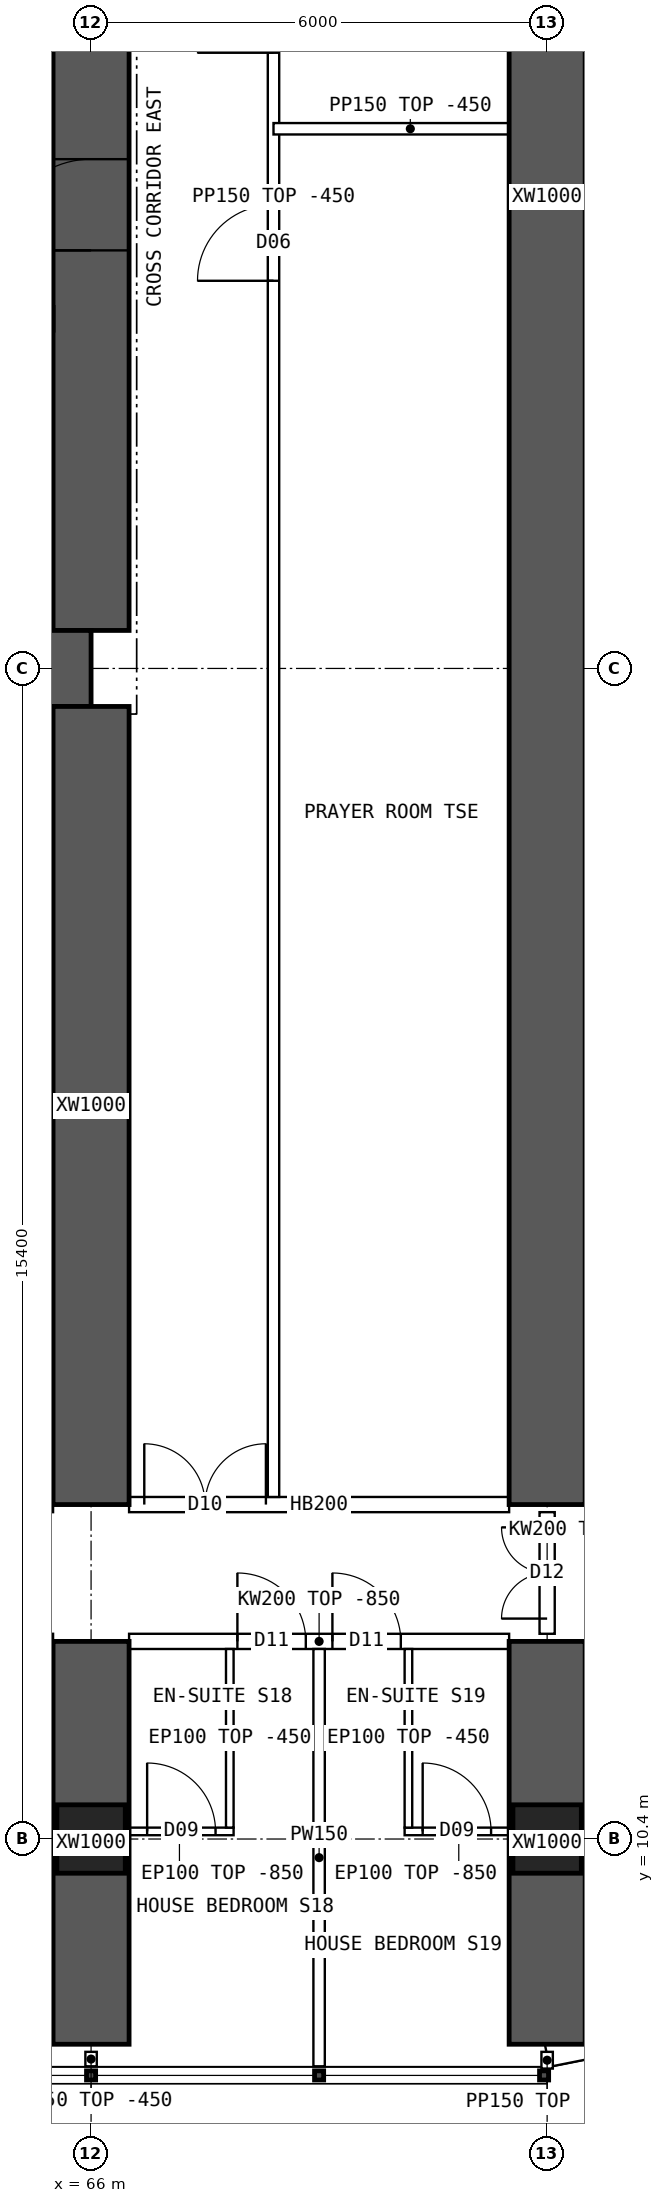
"""IFC4 building model, lengths in metres.
Left out: names, types, materials, properties, quantities, classifications, styles, units other than length and angle.
Written with IfcOpenShell. Run it as: python <this file> out.ifc"""

import sys

from ifc_helpers import new_model, si_unit, direction, frame, frame_2d, origin, origin_2d, place, context, subcontext, project, spatial, polyline, rectangle, hollow_rectangle, outline, extrude, element, fill, save


model = new_model("IFC4")
c1 = context("Model", 3, precision=1e-05, world=origin(), true_north=direction((0.0, 1.0)))
c2 = subcontext(c1, "Body", "Model", "MODEL_VIEW")
j1 = project(units=[si_unit("LENGTHUNIT", "METRE"), si_unit("PLANEANGLEUNIT", "RADIAN")], contexts=[c1])
p1 = place(None, origin())
s1 = spatial("IfcSite", under=j1, at=p1, CompositionType="ELEMENT")
p2 = place(p1, origin())
s2 = spatial("IfcBuilding", under=s1, at=p2, CompositionType="ELEMENT")
p3 = place(p2, frame((0.0, 0.0, 20.2)))
s3 = spatial("IfcBuildingStorey", under=s2, at=p3, CompositionType="ELEMENT", Elevation=20.2)
for number, where, z_axis, x_axis in (
    (1, (66.0, 10.4, 0.0), (0.0, 0.0, 1.0), (1.0, 0.0, 0.0)),
    (2, (72.0, 10.4, 0.0), (0.0, 0.0, 1.0), (1.0, 0.0, 0.0)),
):
    element("IfcColumn", number, at=place(p3, frame(where, z_axis=z_axis, x_axis=x_axis)), inside=s3, PredefinedType="COLUMN", context=c2, shape_type="SweptSolid", body=[
        extrude(hollow_rectangle(XDim=0.9, YDim=0.9, WallThickness=0.09, at=origin_2d()), origin(), (0.0, 0.0, 1.0), 3.75),
    ])
p4 = place(p3, frame((18.0, 25.8, 0.0), z_axis=(0.0, 0.0, 1.0), x_axis=(1.0, 0.0, 0.0)))
e3 = element("IfcWall", 3, at=p4, inside=s3, PredefinedType="SHEAR", context=c2, shape_type="SweptSolid", body=[
    extrude(rectangle(XDim=48.0, YDim=1.0, at=frame_2d((24.0, 0.0))), origin(), (0.0, 0.0, 1.0), 3.75),
])
p5 = place(p3, frame((66.0, 26.3, 0.0), z_axis=(0.0, 0.0, 1.0), x_axis=(0.0, 1.0, 0.0)))
e4 = element("IfcWall", 4, at=p5, inside=s3, PredefinedType="SHEAR", context=c2, shape_type="SweptSolid", body=[
    extrude(rectangle(XDim=11.4, YDim=1.0, at=frame_2d((5.7, 0.0))), origin(), (0.0, 0.0, 1.0), 3.75),
])
p6 = place(p5, frame((5.0, 0.0, 0.0)))
e5 = element("IfcOpeningElement", 5, at=p6, cuts=e4, PredefinedType="OPENING", context=c2, shape_type="SweptSolid", body=[
    extrude(rectangle(XDim=1.2, YDim=2.1, at=frame_2d((0.6, 1.05))), frame((0.0, 0.51, 0.0), z_axis=(0.0, -1.0, 0.0), x_axis=(1.0, 0.0, 0.0)), (0.0, 0.0, 1.0), 1.02),
])
p7 = place(p3, frame((66.0, 7.7, 0.0), z_axis=(0.0, 0.0, 1.0), x_axis=(0.0, 1.0, 0.0)))
e6 = element("IfcWall", 6, at=p7, inside=s3, PredefinedType="SHEAR", context=c2, shape_type="SweptSolid", body=[
    extrude(rectangle(XDim=5.3, YDim=1.0, at=frame_2d((2.65, 0.0))), origin(), (0.0, 0.0, 1.0), 3.75),
])
p8 = place(p3, frame((66.0, 14.8, 0.0), z_axis=(0.0, 0.0, 1.0), x_axis=(0.0, 1.0, 0.0)))
e7 = element("IfcWall", 7, at=p8, inside=s3, PredefinedType="SHEAR", context=c2, shape_type="SweptSolid", body=[
    extrude(rectangle(XDim=10.5, YDim=1.0, at=frame_2d((5.25, 0.0))), origin(), (0.0, 0.0, 1.0), 3.75),
])
p9 = place(p3, frame((72.0, 7.7, 0.0), z_axis=(0.0, 0.0, 1.0), x_axis=(0.0, 1.0, 0.0)))
e8 = element("IfcWall", 8, at=p9, inside=s3, PredefinedType="SHEAR", context=c2, shape_type="SweptSolid", body=[
    extrude(rectangle(XDim=5.3, YDim=1.0, at=frame_2d((2.65, 0.0))), origin(), (0.0, 0.0, 1.0), 3.75),
])
p10 = place(p3, frame((72.0, 14.8, 0.0), z_axis=(0.0, 0.0, 1.0), x_axis=(0.0, 1.0, 0.0)))
e9 = element("IfcWall", 9, at=p10, inside=s3, PredefinedType="SHEAR", context=c2, shape_type="SweptSolid", body=[
    extrude(rectangle(XDim=34.4, YDim=1.0, at=frame_2d((17.2, 0.0))), origin(), (0.0, 0.0, 1.0), 3.75),
])
p11 = place(p3, frame((72.0, 7.55, 0.0), z_axis=(0.0, 0.0, 1.0), x_axis=(0.980787251524, 0.195080412259, 0.0)))
e10 = element("IfcWall", 10, at=p11, inside=s3, PredefinedType="SOLIDWALL", context=c2, shape_type="SweptSolid", body=[
    extrude(outline(polyline([(-0.03, -0.15), (3.249, -0.15), (3.189, 0.15), (0.03, 0.15), (-0.03, -0.15)])), origin(), (0.0, 0.0, 1.0), 3.3),
])
p12 = place(p11, frame((0.909, 0.0, 0.9)))
e11 = element("IfcOpeningElement", 11, at=p12, cuts=e10, PredefinedType="OPENING", context=c2, shape_type="SweptSolid", body=[
    extrude(rectangle(XDim=1.4, YDim=1.8, at=frame_2d((0.7, 0.9))), frame((0.0, 0.16, 0.0), z_axis=(0.0, -1.0, 0.0), x_axis=(1.0, 0.0, 0.0)), (0.0, 0.0, 1.0), 0.32),
])
p13 = place(p3, frame((66.5, 13.0, 0.0), z_axis=(0.0, 0.0, 1.0), x_axis=(1.0, 0.0, 0.0)))
e12 = element("IfcWall", 12, at=p13, inside=s3, PredefinedType="SOLIDWALL", context=c2, shape_type="SweptSolid", body=[
    extrude(outline(polyline([(0.0, 0.0), (5.0, 0.0), (5.0, 2.9), (0.0, 2.9), (0.0, 0.0)])), frame((0.0, 0.1, 0.0), z_axis=(0.0, -1.0, 0.0), x_axis=(1.0, 0.0, 0.0)), (0.0, 0.0, 1.0), 0.2),
])
p14 = place(p13, frame((1.425, 0.0, 0.0)))
e13 = element("IfcOpeningElement", 13, at=p14, cuts=e12, PredefinedType="OPENING", context=c2, shape_type="SweptSolid", body=[
    extrude(rectangle(XDim=0.9, YDim=2.1, at=frame_2d((0.45, 1.05))), frame((0.0, 0.11, 0.0), z_axis=(0.0, -1.0, 0.0), x_axis=(1.0, 0.0, 0.0)), (0.0, 0.0, 1.0), 0.22),
])
p15 = place(p13, frame((2.675, 0.0, 0.0)))
e14 = element("IfcOpeningElement", 14, at=p15, cuts=e12, PredefinedType="OPENING", context=c2, shape_type="SweptSolid", body=[
    extrude(rectangle(XDim=0.9, YDim=2.1, at=frame_2d((0.45, 1.05))), frame((0.0, 0.11, 0.0), z_axis=(0.0, -1.0, 0.0), x_axis=(1.0, 0.0, 0.0)), (0.0, 0.0, 1.0), 0.22),
])
p16 = place(p3, frame((66.5, 14.8, 0.0), z_axis=(0.0, 0.0, 1.0), x_axis=(1.0, 0.0, 0.0)))
e15 = element("IfcWall", 15, at=p16, inside=s3, PredefinedType="SOLIDWALL", context=c2, shape_type="SweptSolid", body=[
    extrude(rectangle(XDim=5.0, YDim=0.2, at=frame_2d((2.5, 0.0))), origin(), (0.0, 0.0, 1.0), 3.3),
])
p17 = place(p16, frame((0.2, 0.0, 0.0)))
e16 = element("IfcOpeningElement", 16, at=p17, cuts=e15, PredefinedType="OPENING", context=c2, shape_type="SweptSolid", body=[
    extrude(rectangle(XDim=1.6, YDim=2.1, at=frame_2d((0.8, 1.05))), frame((0.0, 0.11, 0.0), z_axis=(0.0, -1.0, 0.0), x_axis=(1.0, 0.0, 0.0)), (0.0, 0.0, 1.0), 0.22),
])
p18 = place(p3, frame((65.55, 10.5, 0.0), z_axis=(0.0, 0.0, 1.0), x_axis=(-1.0, 0.0, 0.0)))
e17 = element("IfcWall", 17, at=p18, inside=s3, PredefinedType="PARTITIONING", context=c2, shape_type="SweptSolid", body=[
    extrude(outline(polyline([(0.0, 0.0), (1.425, 0.0), (1.425, 2.9), (0.0, 2.9), (0.0, 0.0)])), frame((0.0, 0.05, 0.0), z_axis=(0.0, -1.0, 0.0), x_axis=(1.0, 0.0, 0.0)), (0.0, 0.0, 1.0), 0.1),
])
p19 = place(p18, frame((0.288, 0.0, 0.0)))
e18 = element("IfcOpeningElement", 18, at=p19, cuts=e17, PredefinedType="OPENING", context=c2, shape_type="SweptSolid", body=[
    extrude(rectangle(XDim=0.9, YDim=2.1, at=frame_2d((0.45, 1.05))), frame((0.0, 0.06, 0.0), z_axis=(0.0, -1.0, 0.0), x_axis=(1.0, 0.0, 0.0)), (0.0, 0.0, 1.0), 0.12),
])
p20 = place(p3, frame((69.0, 7.41, 0.0), z_axis=(0.0, 0.0, 1.0), x_axis=(0.0, 1.0, 0.0)))
e19 = element("IfcWall", 19, at=p20, inside=s3, PredefinedType="PARTITIONING", context=c2, shape_type="SweptSolid", body=[
    extrude(outline(polyline([(0.0, 0.0), (5.49, 0.0), (5.49, 2.9), (5.442, 2.9), (5.44, 3.3), (3.192, 3.3), (3.19, 2.9), (2.792, 2.9), (2.79, 3.3), (0.0, 3.3), (0.0, 0.0)])), frame((0.0, 0.075, 0.0), z_axis=(0.0, -1.0, 0.0), x_axis=(1.0, 0.0, 0.0)), (0.0, 0.0, 1.0), 0.15),
])
p21 = place(p3, frame((67.875, 10.5, 0.0), z_axis=(0.0, 0.0, 1.0), x_axis=(-1.0, 0.0, 0.0)))
e20 = element("IfcWall", 20, at=p21, inside=s3, PredefinedType="PARTITIONING", context=c2, shape_type="SweptSolid", body=[
    extrude(outline(polyline([(0.0, 0.0), (1.425, 0.0), (1.425, 2.9), (0.0, 2.9), (0.0, 0.0)])), frame((0.0, 0.05, 0.0), z_axis=(0.0, -1.0, 0.0), x_axis=(1.0, 0.0, 0.0)), (0.0, 0.0, 1.0), 0.1),
])
p22 = place(p21, frame((0.238, 0.0, 0.0)))
e21 = element("IfcOpeningElement", 21, at=p22, cuts=e20, PredefinedType="OPENING", context=c2, shape_type="SweptSolid", body=[
    extrude(rectangle(XDim=0.9, YDim=2.1, at=frame_2d((0.45, 1.05))), frame((0.0, 0.06, 0.0), z_axis=(0.0, -1.0, 0.0), x_axis=(1.0, 0.0, 0.0)), (0.0, 0.0, 1.0), 0.12),
])
p23 = place(p3, frame((67.825, 10.55, 0.0), z_axis=(0.0, 0.0, 1.0), x_axis=(0.0, 1.0, 0.0)))
e22 = element("IfcWall", 22, at=p23, inside=s3, PredefinedType="PARTITIONING", context=c2, shape_type="SweptSolid", body=[
    extrude(outline(polyline([(0.0, 0.0), (2.35, 0.0), (2.35, 2.9), (2.302, 2.9), (2.3, 3.3), (0.052, 3.3), (0.05, 2.9), (0.0, 2.9), (0.0, 0.0)])), frame((0.0, 0.05, 0.0), z_axis=(0.0, -1.0, 0.0), x_axis=(1.0, 0.0, 0.0)), (0.0, 0.0, 1.0), 0.1),
])
p24 = place(p3, frame((71.55, 10.5, 0.0), z_axis=(0.0, 0.0, 1.0), x_axis=(-1.0, 0.0, 0.0)))
e23 = element("IfcWall", 23, at=p24, inside=s3, PredefinedType="PARTITIONING", context=c2, shape_type="SweptSolid", body=[
    extrude(outline(polyline([(0.0, 0.0), (1.425, 0.0), (1.425, 2.9), (0.0, 2.9), (0.0, 0.0)])), frame((0.0, 0.05, 0.0), z_axis=(0.0, -1.0, 0.0), x_axis=(1.0, 0.0, 0.0)), (0.0, 0.0, 1.0), 0.1),
])
p25 = place(p24, frame((0.288, 0.0, 0.0)))
e24 = element("IfcOpeningElement", 24, at=p25, cuts=e23, PredefinedType="OPENING", context=c2, shape_type="SweptSolid", body=[
    extrude(rectangle(XDim=0.9, YDim=2.1, at=frame_2d((0.45, 1.05))), frame((0.0, 0.06, 0.0), z_axis=(0.0, -1.0, 0.0), x_axis=(1.0, 0.0, 0.0)), (0.0, 0.0, 1.0), 0.12),
])
p26 = place(p3, frame((70.175, 10.55, 0.0), z_axis=(0.0, 0.0, 1.0), x_axis=(0.0, 1.0, 0.0)))
e25 = element("IfcWall", 25, at=p26, inside=s3, PredefinedType="PARTITIONING", context=c2, shape_type="SweptSolid", body=[
    extrude(outline(polyline([(0.0, 0.0), (2.35, 0.0), (2.35, 2.9), (2.302, 2.9), (2.3, 3.3), (0.052, 3.3), (0.05, 2.9), (0.0, 2.9), (0.0, 0.0)])), frame((0.0, 0.05, 0.0), z_axis=(0.0, -1.0, 0.0), x_axis=(1.0, 0.0, 0.0)), (0.0, 0.0, 1.0), 0.1),
])
p27 = place(p3, frame((68.4, 14.9, 0.0), z_axis=(0.0, 0.0, 1.0), x_axis=(0.0, 1.0, 0.0)))
e26 = element("IfcWall", 26, at=p27, inside=s3, PredefinedType="PARTITIONING", context=c2, shape_type="SweptSolid", body=[
    extrude(rectangle(XDim=34.2, YDim=0.15, at=frame_2d((17.1, 0.0))), origin(), (0.0, 0.0, 1.0), 3.3),
])
p28 = place(p27, frame((16.0, 0.0, 0.0)))
e27 = element("IfcOpeningElement", 27, at=p28, cuts=e26, PredefinedType="OPENING", context=c2, shape_type="SweptSolid", body=[
    extrude(rectangle(XDim=1.0, YDim=2.1, at=frame_2d((0.5, 1.05))), frame((0.0, 0.085, 0.0), z_axis=(0.0, -1.0, 0.0), x_axis=(1.0, 0.0, 0.0)), (0.0, 0.0, 1.0), 0.17),
])
p29 = place(p27, frame((19.0, 0.0, 0.0)))
e28 = element("IfcOpeningElement", 28, at=p29, cuts=e26, PredefinedType="OPENING", context=c2, shape_type="SweptSolid", body=[
    extrude(rectangle(XDim=1.0, YDim=2.1, at=frame_2d((0.5, 1.05))), frame((0.0, 0.085, 0.0), z_axis=(0.0, -1.0, 0.0), x_axis=(1.0, 0.0, 0.0)), (0.0, 0.0, 1.0), 0.17),
])
p30 = place(p3, frame((68.4, 32.9, 0.0), z_axis=(0.0, 0.0, 1.0), x_axis=(1.0, 0.0, 0.0)))
e29 = element("IfcWall", 29, at=p30, inside=s3, PredefinedType="PARTITIONING", context=c2, shape_type="SweptSolid", body=[
    extrude(rectangle(XDim=3.6, YDim=0.15, at=frame_2d((1.8, 0.0))), origin(), (0.0, 0.0, 1.0), 3.3),
])
p31 = place(p3, frame((72.075, 30.85, 0.0), z_axis=(0.0, 0.0, 1.0), x_axis=(1.0, 0.0, 0.0)))
e30 = element("IfcWall", 30, at=p31, inside=s3, PredefinedType="PARTITIONING", context=c2, shape_type="SweptSolid", body=[
    extrude(outline(polyline([(0.0, 0.0), (8.02, 0.0), (8.02, 3.3), (6.227, 3.3), (6.225, 2.85), (5.627, 2.85), (5.625, 3.3), (0.0, 3.3), (0.0, 0.0)])), frame((0.0, 0.075, 0.0), z_axis=(0.0, -1.0, 0.0), x_axis=(1.0, 0.0, 0.0)), (0.0, 0.0, 1.0), 0.15),
])
p32 = place(p3, frame((72.0, 13.1, 0.0), z_axis=(0.0, 0.0, 1.0), x_axis=(0.0, 1.0, 0.0)))
e31 = element("IfcWall", 31, at=p32, inside=s3, PredefinedType="SOLIDWALL", context=c2, shape_type="SweptSolid", body=[
    extrude(outline(polyline([(0.0, 0.0), (1.6, 0.0), (1.6, 2.85), (0.0, 2.85), (0.0, 0.0)])), frame((0.0, 0.1, 0.0), z_axis=(0.0, -1.0, 0.0), x_axis=(1.0, 0.0, 0.0)), (0.0, 0.0, 1.0), 0.2),
])
p33 = place(p32, frame((0.2, 0.0, 0.0)))
e32 = element("IfcOpeningElement", 32, at=p33, cuts=e31, PredefinedType="OPENING", context=c2, shape_type="SweptSolid", body=[
    extrude(rectangle(XDim=1.2, YDim=2.1, at=frame_2d((0.6, 1.05))), frame((0.0, 0.11, 0.0), z_axis=(0.0, -1.0, 0.0), x_axis=(1.0, 0.0, 0.0)), (0.0, 0.0, 1.0), 0.22),
])
p34 = place(p3, frame((66.0, 7.6, 0.0), z_axis=(0.0, 0.0, 1.0), x_axis=(0.0, -1.0, 0.0)))
e33 = element("IfcWall", 33, at=p34, inside=s3, PredefinedType="PARTITIONING", context=c2, shape_type="SweptSolid", body=[
    extrude(rectangle(XDim=0.19, YDim=0.15, at=frame_2d((0.095, 0.0))), origin(), (0.0, 0.0, 1.0), 3.3),
])
p35 = place(p3, frame((72.0, 7.6, 0.0), z_axis=(0.0, 0.0, 1.0), x_axis=(0.0, -1.0, 0.0)))
e34 = element("IfcWall", 34, at=p35, inside=s3, PredefinedType="PARTITIONING", context=c2, shape_type="SweptSolid", body=[
    extrude(rectangle(XDim=0.22, YDim=0.15, at=frame_2d((0.11, 0.0))), origin(), (0.0, 0.0, 1.0), 3.3),
])
p36 = place(p6, origin())
e35 = element("IfcDoor", 35, at=p36, inside=s3, OperationType="SINGLE_SWING_LEFT", PredefinedType="DOOR", context=c2, shape_type="SweptSolid", body=[
    extrude(rectangle(XDim=1.2, YDim=2.1, at=frame_2d((0.6, 1.05))), frame((0.0, 0.025, 0.0), z_axis=(0.0, -1.0, 0.0), x_axis=(1.0, 0.0, 0.0)), (0.0, 0.0, 1.0), 0.05),
])
fill(e5, e35)
p37 = place(p17, origin())
e36 = element("IfcDoor", 36, at=p37, inside=s3, OperationType="DOUBLE_DOOR_SINGLE_SWING", PredefinedType="DOOR", context=c2, shape_type="SweptSolid", body=[
    extrude(rectangle(XDim=1.6, YDim=2.1, at=frame_2d((0.8, 1.05))), frame((0.0, 0.025, 0.0), z_axis=(0.0, -1.0, 0.0), x_axis=(1.0, 0.0, 0.0)), (0.0, 0.0, 1.0), 0.05),
])
fill(e16, e36)
p38 = place(p22, origin())
e37 = element("IfcDoor", 37, at=p38, inside=s3, OperationType="SINGLE_SWING_RIGHT", PredefinedType="DOOR", context=c2, shape_type="SweptSolid", body=[
    extrude(rectangle(XDim=0.9, YDim=2.1, at=frame_2d((0.45, 1.05))), frame((0.0, 0.025, 0.0), z_axis=(0.0, -1.0, 0.0), x_axis=(1.0, 0.0, 0.0)), (0.0, 0.0, 1.0), 0.05),
])
fill(e21, e37)
p39 = place(p14, origin())
e38 = element("IfcDoor", 38, at=p39, inside=s3, OperationType="SINGLE_SWING_LEFT", PredefinedType="DOOR", context=c2, shape_type="SweptSolid", body=[
    extrude(rectangle(XDim=0.9, YDim=2.1, at=frame_2d((0.45, 1.05))), frame((0.0, 0.025, 0.0), z_axis=(0.0, -1.0, 0.0), x_axis=(1.0, 0.0, 0.0)), (0.0, 0.0, 1.0), 0.05),
])
fill(e13, e38)
p40 = place(p25, origin())
e39 = element("IfcDoor", 39, at=p40, inside=s3, OperationType="SINGLE_SWING_RIGHT", PredefinedType="DOOR", context=c2, shape_type="SweptSolid", body=[
    extrude(rectangle(XDim=0.9, YDim=2.1, at=frame_2d((0.45, 1.05))), frame((0.0, 0.025, 0.0), z_axis=(0.0, -1.0, 0.0), x_axis=(1.0, 0.0, 0.0)), (0.0, 0.0, 1.0), 0.05),
])
fill(e24, e39)
p41 = place(p15, origin())
e40 = element("IfcDoor", 40, at=p41, inside=s3, OperationType="SINGLE_SWING_LEFT", PredefinedType="DOOR", context=c2, shape_type="SweptSolid", body=[
    extrude(rectangle(XDim=0.9, YDim=2.1, at=frame_2d((0.45, 1.05))), frame((0.0, 0.025, 0.0), z_axis=(0.0, -1.0, 0.0), x_axis=(1.0, 0.0, 0.0)), (0.0, 0.0, 1.0), 0.05),
])
fill(e14, e40)
p42 = place(p28, origin())
e41 = element("IfcDoor", 41, at=p42, inside=s3, OperationType="SINGLE_SWING_LEFT", PredefinedType="DOOR", context=c2, shape_type="SweptSolid", body=[
    extrude(rectangle(XDim=1.0, YDim=2.1, at=frame_2d((0.5, 1.05))), frame((0.0, 0.025, 0.0), z_axis=(0.0, -1.0, 0.0), x_axis=(1.0, 0.0, 0.0)), (0.0, 0.0, 1.0), 0.05),
])
fill(e27, e41)
p43 = place(p33, origin())
e42 = element("IfcDoor", 42, at=p43, inside=s3, OperationType="DOUBLE_DOOR_SINGLE_SWING", PredefinedType="DOOR", context=c2, shape_type="SweptSolid", body=[
    extrude(rectangle(XDim=1.2, YDim=2.1, at=frame_2d((0.6, 1.05))), frame((0.0, 0.025, 0.0), z_axis=(0.0, -1.0, 0.0), x_axis=(1.0, 0.0, 0.0)), (0.0, 0.0, 1.0), 0.05),
])
fill(e32, e42)
save(model, sys.argv[1])
